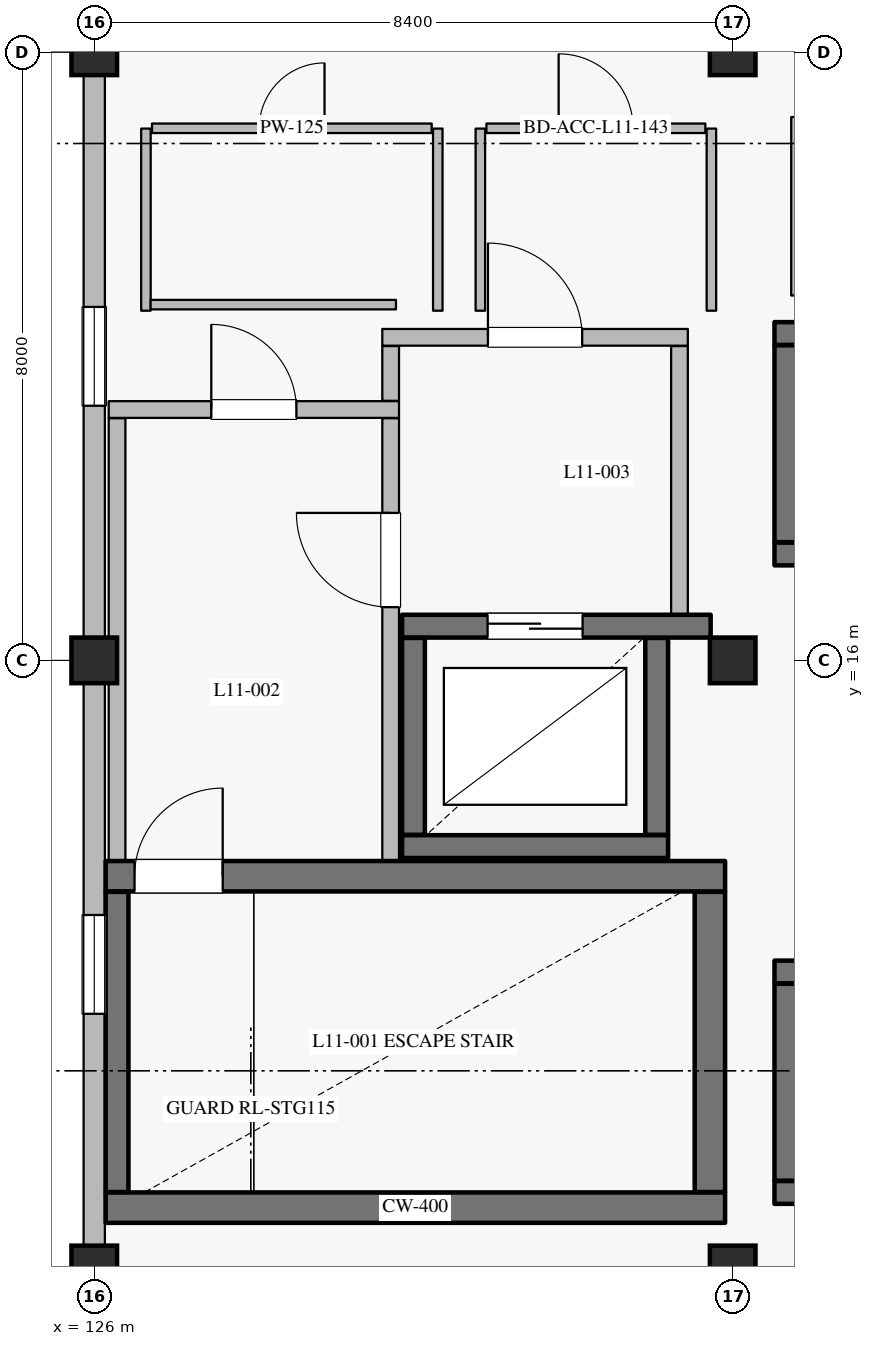
"""IFC4 building model, lengths in metres.
Left out: names, types, materials, properties, quantities, classifications, styles, units other than length and angle.
Written with IfcOpenShell. Run it as: python <this file> out.ifc"""

import sys

from ifc_helpers import new_model, si_unit, direction, frame, frame_2d, origin, origin_2d, place, context, subcontext, project, spatial, rectangle, extrude, element, fill, save


model = new_model("IFC4")
c1 = context("Model", 3, precision=1e-05, world=origin(), true_north=direction((0.0, 1.0)))
c2 = subcontext(c1, "Body", "Model", "MODEL_VIEW")
j1 = project(units=[si_unit("LENGTHUNIT", "METRE"), si_unit("PLANEANGLEUNIT", "RADIAN")], contexts=[c1])
p1 = place(None, origin())
s1 = spatial("IfcSite", under=j1, at=p1, CompositionType="ELEMENT")
p2 = place(p1, origin())
s2 = spatial("IfcBuilding", under=s1, at=p2, CompositionType="ELEMENT")
p3 = place(p2, frame((0.0, 0.0, 47.4)))
s3 = spatial("IfcBuildingStorey", under=s2, at=p3, CompositionType="ELEMENT", Elevation=47.4)
for number, where, z_axis, x_axis in (
    (1, (126.0, 16.0, 0.0), (0.0, 0.0, 1.0), (1.0, 0.0, 0.0)),
    (2, (134.4, 16.0, 0.0), (0.0, 0.0, 1.0), (1.0, 0.0, 0.0)),
    (3, (126.0, 8.0, 0.0), (0.0, 0.0, 1.0), (1.0, 0.0, 0.0)),
    (4, (126.0, 24.0, 0.0), (0.0, 0.0, 1.0), (1.0, 0.0, 0.0)),
    (5, (134.4, 8.0, 0.0), (0.0, 0.0, 1.0), (1.0, 0.0, 0.0)),
    (6, (134.4, 24.0, 0.0), (0.0, 0.0, 1.0), (1.0, 0.0, 0.0)),
):
    element("IfcColumn", number, at=place(p3, frame(where, z_axis=z_axis, x_axis=x_axis)), inside=s3, PredefinedType="COLUMN", context=c2, shape_type="SweptSolid", body=[
        extrude(rectangle(XDim=0.6, YDim=0.6, at=origin_2d()), origin(), (0.0, 0.0, 1.0), 4.2),
    ])
p4 = place(p3, frame((126.0, 8.3, 0.0), z_axis=(0.0, 0.0, 1.0), x_axis=(0.0, 1.0, 0.0)))
e7 = element("IfcWall", 7, at=p4, inside=s3, PredefinedType="SOLIDWALL", context=c2, shape_type="SweptSolid", body=[
    extrude(rectangle(XDim=7.4, YDim=0.28, at=frame_2d((3.7, 0.0))), origin(), (0.0, 0.0, 1.0), 3.3),
])
p5 = place(p4, frame((3.05, 0.0, 0.75)))
e8 = element("IfcOpeningElement", 8, at=p5, cuts=e7, PredefinedType="OPENING", context=c2, shape_type="SweptSolid", body=[
    extrude(rectangle(XDim=1.3, YDim=1.65, at=frame_2d((0.65, 0.825))), frame((0.0, 0.15, 0.0), z_axis=(0.0, -1.0, 0.0), x_axis=(1.0, 0.0, 0.0)), (0.0, 0.0, 1.0), 0.3),
])
p6 = place(p3, frame((126.0, 16.3, 0.0), z_axis=(0.0, 0.0, 1.0), x_axis=(0.0, 1.0, 0.0)))
e9 = element("IfcWall", 9, at=p6, inside=s3, PredefinedType="SOLIDWALL", context=c2, shape_type="SweptSolid", body=[
    extrude(rectangle(XDim=7.4, YDim=0.28, at=frame_2d((3.7, 0.0))), origin(), (0.0, 0.0, 1.0), 3.3),
])
p7 = place(p6, frame((3.05, 0.0, 0.75)))
e10 = element("IfcOpeningElement", 10, at=p7, cuts=e9, PredefinedType="OPENING", context=c2, shape_type="SweptSolid", body=[
    extrude(rectangle(XDim=1.3, YDim=1.65, at=frame_2d((0.65, 0.825))), frame((0.0, 0.15, 0.0), z_axis=(0.0, -1.0, 0.0), x_axis=(1.0, 0.0, 0.0)), (0.0, 0.0, 1.0), 0.3),
])
p8 = place(p3, frame((134.95, 17.4, 0.0), z_axis=(0.0, 0.0, 1.0), x_axis=(1.0, 0.0, 0.0)))
e11 = element("IfcWall", 11, at=p8, inside=s3, PredefinedType="SHEAR", context=c2, shape_type="SweptSolid", body=[
    extrude(rectangle(XDim=3.1, YDim=0.3, at=frame_2d((1.55, 0.0))), origin(), (0.0, 0.0, 1.0), 3.935),
])
p9 = place(p8, frame((1.0, 0.0, 0.0)))
e12 = element("IfcOpeningElement", 12, at=p9, cuts=e11, PredefinedType="OPENING", context=c2, shape_type="SweptSolid", body=[
    extrude(rectangle(XDim=1.1, YDim=2.2, at=frame_2d((0.55, 1.1))), frame((0.0, 0.16, 0.0), z_axis=(0.0, -1.0, 0.0), x_axis=(1.0, 0.0, 0.0)), (0.0, 0.0, 1.0), 0.32),
])
p10 = place(p3, frame((138.05, 20.3, 0.0), z_axis=(0.0, 0.0, 1.0), x_axis=(-1.0, 0.0, 0.0)))
e13 = element("IfcWall", 13, at=p10, inside=s3, PredefinedType="SHEAR", context=c2, shape_type="SweptSolid", body=[
    extrude(rectangle(XDim=3.1, YDim=0.3, at=frame_2d((1.55, 0.0))), origin(), (0.0, 0.0, 1.0), 3.935),
])
p11 = place(p3, frame((135.1, 20.145, 0.0), z_axis=(0.0, 0.0, 1.0), x_axis=(0.0, -1.0, 0.0)))
e14 = element("IfcWall", 14, at=p11, inside=s3, PredefinedType="SHEAR", context=c2, shape_type="SweptSolid", body=[
    extrude(rectangle(XDim=2.59, YDim=0.3, at=frame_2d((1.295, 0.0))), origin(), (0.0, 0.0, 1.0), 3.935),
])
p12 = place(p3, frame((134.95, 9.0, 0.0), z_axis=(0.0, 0.0, 1.0), x_axis=(1.0, 0.0, 0.0)))
e15 = element("IfcWall", 15, at=p12, inside=s3, PredefinedType="SHEAR", context=c2, shape_type="SweptSolid", body=[
    extrude(rectangle(XDim=3.1, YDim=0.3, at=frame_2d((1.55, 0.0))), origin(), (0.0, 0.0, 1.0), 3.935),
])
p13 = place(p3, frame((138.05, 11.9, 0.0), z_axis=(0.0, 0.0, 1.0), x_axis=(-1.0, 0.0, 0.0)))
e16 = element("IfcWall", 16, at=p13, inside=s3, PredefinedType="SHEAR", context=c2, shape_type="SweptSolid", body=[
    extrude(rectangle(XDim=3.1, YDim=0.3, at=frame_2d((1.55, 0.0))), origin(), (0.0, 0.0, 1.0), 3.935),
])
p14 = place(p13, frame((1.0, 0.0, 0.0)))
e17 = element("IfcOpeningElement", 17, at=p14, cuts=e16, PredefinedType="OPENING", context=c2, shape_type="SweptSolid", body=[
    extrude(rectangle(XDim=1.1, YDim=2.2, at=frame_2d((0.55, 1.1))), frame((0.0, 0.16, 0.0), z_axis=(0.0, -1.0, 0.0), x_axis=(1.0, 0.0, 0.0)), (0.0, 0.0, 1.0), 0.32),
])
p15 = place(p3, frame((135.1, 11.745, 0.0), z_axis=(0.0, 0.0, 1.0), x_axis=(0.0, -1.0, 0.0)))
e18 = element("IfcWall", 18, at=p15, inside=s3, PredefinedType="SHEAR", context=c2, shape_type="SweptSolid", body=[
    extrude(rectangle(XDim=2.59, YDim=0.3, at=frame_2d((1.295, 0.0))), origin(), (0.0, 0.0, 1.0), 3.935),
])
p16 = place(p3, frame((130.05, 13.55, 0.0), z_axis=(0.0, 0.0, 1.0), x_axis=(1.0, 0.0, 0.0)))
e19 = element("IfcWall", 19, at=p16, inside=s3, PredefinedType="SHEAR", context=c2, shape_type="SweptSolid", body=[
    extrude(rectangle(XDim=3.5, YDim=0.3, at=frame_2d((1.75, 0.0))), origin(), (0.0, 0.0, 1.0), 3.935),
])
p17 = place(p3, frame((133.4, 13.705, 0.0), z_axis=(0.0, 0.0, 1.0), x_axis=(0.0, 1.0, 0.0)))
e20 = element("IfcWall", 20, at=p17, inside=s3, PredefinedType="SHEAR", context=c2, shape_type="SweptSolid", body=[
    extrude(rectangle(XDim=2.59, YDim=0.3, at=frame_2d((1.295, 0.0))), origin(), (0.0, 0.0, 1.0), 3.935),
])
p18 = place(p3, frame((134.11, 16.45, 0.0), z_axis=(0.0, 0.0, 1.0), x_axis=(-1.0, 0.0, 0.0)))
e21 = element("IfcWall", 21, at=p18, inside=s3, PredefinedType="SHEAR", context=c2, shape_type="SweptSolid", body=[
    extrude(rectangle(XDim=4.06, YDim=0.3, at=frame_2d((2.03, 0.0))), origin(), (0.0, 0.0, 1.0), 3.935),
])
p19 = place(p18, frame((1.685, 0.0, 0.0)))
e22 = element("IfcOpeningElement", 22, at=p19, cuts=e21, PredefinedType="OPENING", context=c2, shape_type="SweptSolid", body=[
    extrude(rectangle(XDim=1.25, YDim=2.25, at=frame_2d((0.625, 1.125))), frame((0.0, 0.16, 0.0), z_axis=(0.0, -1.0, 0.0), x_axis=(1.0, 0.0, 0.0)), (0.0, 0.0, 1.0), 0.32),
])
p20 = place(p3, frame((130.2, 16.295, 0.0), z_axis=(0.0, 0.0, 1.0), x_axis=(0.0, -1.0, 0.0)))
e23 = element("IfcWall", 23, at=p20, inside=s3, PredefinedType="SHEAR", context=c2, shape_type="SweptSolid", body=[
    extrude(rectangle(XDim=2.59, YDim=0.3, at=frame_2d((1.295, 0.0))), origin(), (0.0, 0.0, 1.0), 3.935),
])
p21 = place(p3, frame((126.15, 8.8, 0.0), z_axis=(0.0, 0.0, 1.0), x_axis=(1.0, 0.0, 0.0)))
e24 = element("IfcWall", 24, at=p21, inside=s3, PredefinedType="SHEAR", context=c2, shape_type="SweptSolid", body=[
    extrude(rectangle(XDim=8.15, YDim=0.4, at=frame_2d((4.075, 0.0))), origin(), (0.0, 0.0, 1.0), 3.935),
])
p22 = place(p3, frame((134.1, 9.005, 0.0), z_axis=(0.0, 0.0, 1.0), x_axis=(0.0, 1.0, 0.0)))
e25 = element("IfcWall", 25, at=p22, inside=s3, PredefinedType="SHEAR", context=c2, shape_type="SweptSolid", body=[
    extrude(rectangle(XDim=3.95, YDim=0.4, at=frame_2d((1.975, 0.0))), origin(), (0.0, 0.0, 1.0), 3.935),
])
p23 = place(p3, frame((126.15, 13.16, 0.0), z_axis=(0.0, 0.0, 1.0), x_axis=(1.0, 0.0, 0.0)))
e26 = element("IfcWall", 26, at=p23, inside=s3, PredefinedType="SHEAR", context=c2, shape_type="SweptSolid", body=[
    extrude(rectangle(XDim=8.15, YDim=0.4, at=frame_2d((4.075, 0.0))), origin(), (0.0, 0.0, 1.0), 3.935),
])
p24 = place(p23, frame((0.38, 0.0, 0.0)))
e27 = element("IfcOpeningElement", 27, at=p24, cuts=e26, PredefinedType="OPENING", context=c2, shape_type="SweptSolid", body=[
    extrude(rectangle(XDim=1.16, YDim=2.2, at=frame_2d((0.58, 1.1))), frame((0.0, 0.21, 0.0), z_axis=(0.0, -1.0, 0.0), x_axis=(1.0, 0.0, 0.0)), (0.0, 0.0, 1.0), 0.42),
])
p25 = place(p3, frame((126.3, 9.005, 0.0), z_axis=(0.0, 0.0, 1.0), x_axis=(0.0, 1.0, 0.0)))
e28 = element("IfcWall", 28, at=p25, inside=s3, PredefinedType="SHEAR", context=c2, shape_type="SweptSolid", body=[
    extrude(rectangle(XDim=3.95, YDim=0.3, at=frame_2d((1.975, 0.0))), origin(), (0.0, 0.0, 1.0), 3.935),
])
p26 = place(p3, frame((126.3, 13.365, 0.0), z_axis=(0.0, 0.0, 1.0), x_axis=(0.0, 1.0, 0.0)))
e29 = element("IfcWall", 29, at=p26, inside=s3, PredefinedType="PARTITIONING", context=c2, shape_type="SweptSolid", body=[
    extrude(rectangle(XDim=5.82, YDim=0.22, at=frame_2d((2.91, 0.0))), origin(), (0.0, 0.0, 1.0), 3.935),
])
p27 = place(p3, frame((126.19, 19.3, 0.0), z_axis=(0.0, 0.0, 1.0), x_axis=(1.0, 0.0, 0.0)))
e30 = element("IfcWall", 30, at=p27, inside=s3, PredefinedType="PARTITIONING", context=c2, shape_type="SweptSolid", body=[
    extrude(rectangle(XDim=3.82, YDim=0.22, at=frame_2d((1.91, 0.0))), origin(), (0.0, 0.0, 1.0), 3.935),
])
p28 = place(p27, frame((1.35, 0.0, 0.0)))
e31 = element("IfcOpeningElement", 31, at=p28, cuts=e30, PredefinedType="OPENING", context=c2, shape_type="SweptSolid", body=[
    extrude(rectangle(XDim=1.12, YDim=2.2, at=frame_2d((0.56, 1.1))), frame((0.0, 0.12, 0.0), z_axis=(0.0, -1.0, 0.0), x_axis=(1.0, 0.0, 0.0)), (0.0, 0.0, 1.0), 0.24),
])
p29 = place(p3, frame((129.9, 13.365, 0.0), z_axis=(0.0, 0.0, 1.0), x_axis=(0.0, 1.0, 0.0)))
e32 = element("IfcWall", 32, at=p29, inside=s3, PredefinedType="PARTITIONING", context=c2, shape_type="SweptSolid", body=[
    extrude(rectangle(XDim=5.82, YDim=0.22, at=frame_2d((2.91, 0.0))), origin(), (0.0, 0.0, 1.0), 3.935),
])
p30 = place(p29, frame((3.335, 0.0, 0.0)))
e33 = element("IfcOpeningElement", 33, at=p30, cuts=e32, PredefinedType="OPENING", context=c2, shape_type="SweptSolid", body=[
    extrude(rectangle(XDim=1.24, YDim=2.2, at=frame_2d((0.62, 1.1))), frame((0.0, 0.12, 0.0), z_axis=(0.0, -1.0, 0.0), x_axis=(1.0, 0.0, 0.0)), (0.0, 0.0, 1.0), 0.24),
])
p31 = place(p3, frame((129.9, 19.415, 0.0), z_axis=(0.0, 0.0, 1.0), x_axis=(0.0, 1.0, 0.0)))
e34 = element("IfcWall", 34, at=p31, inside=s3, PredefinedType="PARTITIONING", context=c2, shape_type="SweptSolid", body=[
    extrude(rectangle(XDim=0.72, YDim=0.22, at=frame_2d((0.36, 0.0))), origin(), (0.0, 0.0, 1.0), 3.935),
])
p32 = place(p3, frame((133.7, 16.605, 0.0), z_axis=(0.0, 0.0, 1.0), x_axis=(0.0, 1.0, 0.0)))
e35 = element("IfcWall", 35, at=p32, inside=s3, PredefinedType="PARTITIONING", context=c2, shape_type="SweptSolid", body=[
    extrude(rectangle(XDim=3.53, YDim=0.22, at=frame_2d((1.765, 0.0))), origin(), (0.0, 0.0, 1.0), 3.935),
])
p33 = place(p3, frame((129.79, 20.25, 0.0), z_axis=(0.0, 0.0, 1.0), x_axis=(1.0, 0.0, 0.0)))
e36 = element("IfcWall", 36, at=p33, inside=s3, PredefinedType="PARTITIONING", context=c2, shape_type="SweptSolid", body=[
    extrude(rectangle(XDim=4.02, YDim=0.22, at=frame_2d((2.01, 0.0))), origin(), (0.0, 0.0, 1.0), 3.935),
])
p34 = place(p33, frame((1.39, 0.0, 0.0)))
e37 = element("IfcOpeningElement", 37, at=p34, cuts=e36, PredefinedType="OPENING", context=c2, shape_type="SweptSolid", body=[
    extrude(rectangle(XDim=1.24, YDim=2.2, at=frame_2d((0.62, 1.1))), frame((0.0, 0.12, 0.0), z_axis=(0.0, -1.0, 0.0), x_axis=(1.0, 0.0, 0.0)), (0.0, 0.0, 1.0), 0.24),
])
p35 = place(p3, frame((126.76, 23.0, 0.0), z_axis=(0.0, 0.0, 1.0), x_axis=(1.0, 0.0, 0.0)))
e38 = element("IfcWall", 38, at=p35, inside=s3, PredefinedType="PARTITIONING", context=c2, shape_type="SweptSolid", body=[
    extrude(rectangle(XDim=3.68, YDim=0.125, at=frame_2d((1.84, 0.0))), origin(), (0.0, 0.0, 1.0), 3.935),
])
p36 = place(p35, frame((1.41, 0.0, 0.0)))
e39 = element("IfcOpeningElement", 39, at=p36, cuts=e38, PredefinedType="OPENING", context=c2, shape_type="SweptSolid", body=[
    extrude(rectangle(XDim=0.86, YDim=2.12, at=frame_2d((0.43, 1.06))), frame((0.0, 0.073, 0.0), z_axis=(0.0, -1.0, 0.0), x_axis=(1.0, 0.0, 0.0)), (0.0, 0.0, 1.0), 0.145),
])
p37 = place(p3, frame((131.16, 23.0, 0.0), z_axis=(0.0, 0.0, 1.0), x_axis=(1.0, 0.0, 0.0)))
e40 = element("IfcWall", 40, at=p37, inside=s3, PredefinedType="PARTITIONING", context=c2, shape_type="SweptSolid", body=[
    extrude(rectangle(XDim=2.88, YDim=0.125, at=frame_2d((1.44, 0.0))), origin(), (0.0, 0.0, 1.0), 3.935),
])
p38 = place(p37, frame((0.95, 0.0, 0.0)))
e41 = element("IfcOpeningElement", 41, at=p38, cuts=e40, PredefinedType="OPENING", context=c2, shape_type="SweptSolid", body=[
    extrude(rectangle(XDim=0.98, YDim=2.15, at=frame_2d((0.49, 1.075))), frame((0.0, 0.073, 0.0), z_axis=(0.0, -1.0, 0.0), x_axis=(1.0, 0.0, 0.0)), (0.0, 0.0, 1.0), 0.145),
])
p39 = place(p3, frame((135.28, 20.8, 0.0), z_axis=(0.0, 0.0, 1.0), x_axis=(0.0, 1.0, 0.0)))
e42 = element("IfcWall", 42, at=p39, inside=s3, PredefinedType="PARTITIONING", context=c2, shape_type="SweptSolid", body=[
    extrude(rectangle(XDim=2.348, YDim=0.22, at=frame_2d((1.174, 0.0))), origin(), (0.0, 0.0, 1.0), 3.935),
])
for number, where, z_axis, x_axis in (
    (43, (126.68, 20.6, 0.0), (0.0, 0.0, 1.0), (0.0, 1.0, 0.0)),
    (44, (130.52, 20.6, 0.0), (0.0, 0.0, 1.0), (0.0, 1.0, 0.0)),
):
    element("IfcWall", number, at=place(p3, frame(where, z_axis=z_axis, x_axis=x_axis)), inside=s3, PredefinedType="PARTITIONING", context=c2, shape_type="SweptSolid", body=[
        extrude(rectangle(XDim=2.396, YDim=0.125, at=frame_2d((1.198, 0.0))), origin(), (0.0, 0.0, 1.0), 3.935),
    ])
p40 = place(p3, frame((126.742, 20.68, 0.0), z_axis=(0.0, 0.0, 1.0), x_axis=(1.0, 0.0, 0.0)))
e45 = element("IfcWall", 45, at=p40, inside=s3, PredefinedType="PARTITIONING", context=c2, shape_type="SweptSolid", body=[
    extrude(rectangle(XDim=3.228, YDim=0.125, at=frame_2d((1.614, 0.0))), origin(), (0.0, 0.0, 1.0), 3.935),
])
for number, where, z_axis, x_axis in (
    (46, (131.08, 20.6, 0.0), (0.0, 0.0, 1.0), (0.0, 1.0, 0.0)),
    (47, (134.12, 20.6, 0.0), (0.0, 0.0, 1.0), (0.0, 1.0, 0.0)),
):
    element("IfcWall", number, at=place(p3, frame(where, z_axis=z_axis, x_axis=x_axis)), inside=s3, PredefinedType="PARTITIONING", context=c2, shape_type="SweptSolid", body=[
        extrude(rectangle(XDim=2.396, YDim=0.125, at=frame_2d((1.198, 0.0))), origin(), (0.0, 0.0, 1.0), 3.935),
    ])
p41 = place(p5, origin())
e48 = element("IfcWindow", 48, at=p41, inside=s3, PartitioningType="SINGLE_PANEL", PredefinedType="WINDOW", context=c2, shape_type="SweptSolid", body=[
    extrude(rectangle(XDim=1.3, YDim=1.65, at=frame_2d((0.65, 0.825))), frame((0.0, 0.03, 0.0), z_axis=(0.0, -1.0, 0.0), x_axis=(1.0, 0.0, 0.0)), (0.0, 0.0, 1.0), 0.06),
])
fill(e8, e48)
p42 = place(p7, origin())
e49 = element("IfcWindow", 49, at=p42, inside=s3, PartitioningType="SINGLE_PANEL", PredefinedType="WINDOW", context=c2, shape_type="SweptSolid", body=[
    extrude(rectangle(XDim=1.3, YDim=1.65, at=frame_2d((0.65, 0.825))), frame((0.0, 0.03, 0.0), z_axis=(0.0, -1.0, 0.0), x_axis=(1.0, 0.0, 0.0)), (0.0, 0.0, 1.0), 0.06),
])
fill(e10, e49)
p43 = place(p19, origin())
e50 = element("IfcDoor", 50, at=p43, inside=s3, OperationType="DOUBLE_DOOR_SLIDING", PredefinedType="DOOR", context=c2, shape_type="SweptSolid", body=[
    extrude(rectangle(XDim=1.25, YDim=2.25, at=frame_2d((0.625, 1.125))), frame((0.0, 0.025, 0.0), z_axis=(0.0, -1.0, 0.0), x_axis=(1.0, 0.0, 0.0)), (0.0, 0.0, 1.0), 0.05),
])
fill(e22, e50)
p44 = place(p24, origin())
e51 = element("IfcDoor", 51, at=p44, inside=s3, OperationType="SINGLE_SWING_RIGHT", PredefinedType="DOOR", context=c2, shape_type="SweptSolid", body=[
    extrude(rectangle(XDim=1.16, YDim=2.2, at=frame_2d((0.58, 1.1))), frame((0.0, 0.025, 0.0), z_axis=(0.0, -1.0, 0.0), x_axis=(1.0, 0.0, 0.0)), (0.0, 0.0, 1.0), 0.05),
])
fill(e27, e51)
p45 = place(p28, origin())
e52 = element("IfcDoor", 52, at=p45, inside=s3, OperationType="SINGLE_SWING_LEFT", PredefinedType="DOOR", context=c2, shape_type="SweptSolid", body=[
    extrude(rectangle(XDim=1.12, YDim=2.2, at=frame_2d((0.56, 1.1))), frame((0.0, 0.025, 0.0), z_axis=(0.0, -1.0, 0.0), x_axis=(1.0, 0.0, 0.0)), (0.0, 0.0, 1.0), 0.05),
])
fill(e31, e52)
p46 = place(p30, origin())
e53 = element("IfcDoor", 53, at=p46, inside=s3, OperationType="SINGLE_SWING_RIGHT", PredefinedType="DOOR", context=c2, shape_type="SweptSolid", body=[
    extrude(rectangle(XDim=1.24, YDim=2.2, at=frame_2d((0.62, 1.1))), frame((0.0, 0.025, 0.0), z_axis=(0.0, -1.0, 0.0), x_axis=(1.0, 0.0, 0.0)), (0.0, 0.0, 1.0), 0.05),
])
fill(e33, e53)
p47 = place(p34, origin())
e54 = element("IfcDoor", 54, at=p47, inside=s3, OperationType="SINGLE_SWING_LEFT", PredefinedType="DOOR", context=c2, shape_type="SweptSolid", body=[
    extrude(rectangle(XDim=1.24, YDim=2.2, at=frame_2d((0.62, 1.1))), frame((0.0, 0.025, 0.0), z_axis=(0.0, -1.0, 0.0), x_axis=(1.0, 0.0, 0.0)), (0.0, 0.0, 1.0), 0.05),
])
fill(e37, e54)
p48 = place(p36, origin())
e55 = element("IfcDoor", 55, at=p48, inside=s3, OperationType="SINGLE_SWING_RIGHT", PredefinedType="DOOR", context=c2, shape_type="SweptSolid", body=[
    extrude(rectangle(XDim=0.86, YDim=2.12, at=frame_2d((0.43, 1.06))), frame((0.0, 0.025, 0.0), z_axis=(0.0, -1.0, 0.0), x_axis=(1.0, 0.0, 0.0)), (0.0, 0.0, 1.0), 0.05),
])
fill(e39, e55)
p49 = place(p38, origin())
e56 = element("IfcDoor", 56, at=p49, inside=s3, OperationType="SINGLE_SWING_LEFT", PredefinedType="DOOR", context=c2, shape_type="SweptSolid", body=[
    extrude(rectangle(XDim=0.98, YDim=2.15, at=frame_2d((0.49, 1.075))), frame((0.0, 0.025, 0.0), z_axis=(0.0, -1.0, 0.0), x_axis=(1.0, 0.0, 0.0)), (0.0, 0.0, 1.0), 0.05),
])
fill(e41, e56)
save(model, sys.argv[1])
